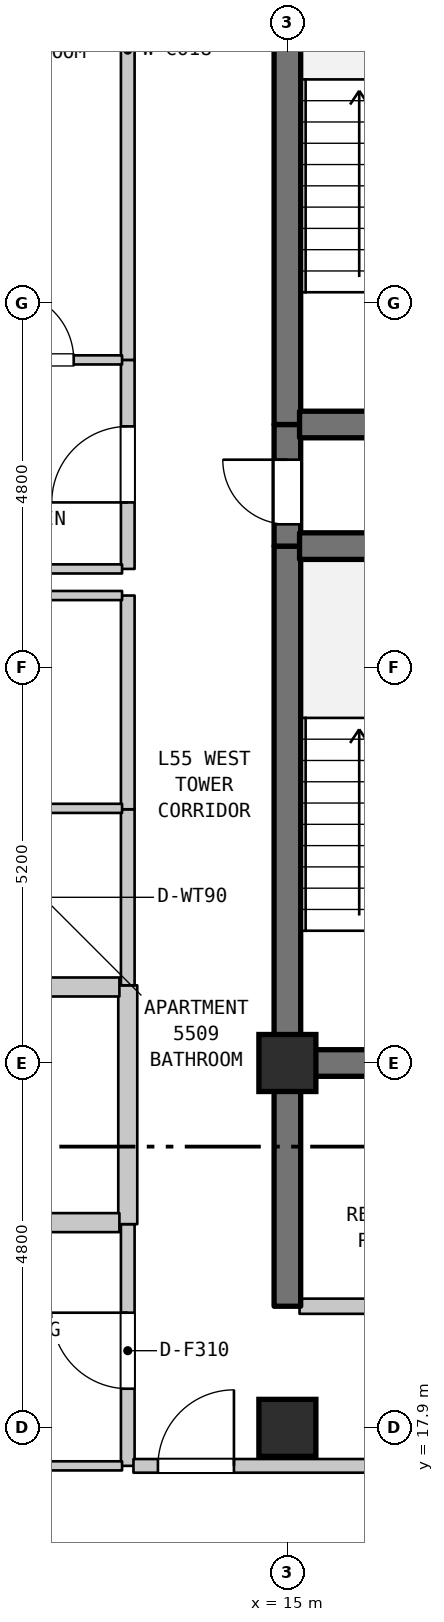
"""IFC4 building model, lengths in metres.
Left out: names, types, materials, properties, quantities, classifications, styles, units other than length and angle.
Written with IfcOpenShell. Run it as: python <this file> out.ifc"""

import sys

from ifc_helpers import new_model, si_unit, direction, frame, frame_2d, origin, origin_2d, place, context, subcontext, project, spatial, rectangle, extrude, element, fill, save


model = new_model("IFC4")
c1 = context("Model", 3, precision=1e-05, world=origin(), true_north=direction((0.0, 1.0)))
c2 = subcontext(c1, "Body", "Model", "MODEL_VIEW")
j1 = project(units=[si_unit("LENGTHUNIT", "METRE"), si_unit("PLANEANGLEUNIT", "RADIAN")], contexts=[c1])
p1 = place(None, origin())
s1 = spatial("IfcSite", under=j1, at=p1, CompositionType="ELEMENT")
p2 = place(p1, origin())
s2 = spatial("IfcBuilding", under=s1, at=p2, CompositionType="ELEMENT")
p3 = place(p2, frame((0.0, 0.0, 222.8)))
s3 = spatial("IfcBuildingStorey", under=s2, at=p3, CompositionType="ELEMENT", Elevation=222.8)
for number, where, z_axis, x_axis in (
    (1, (15.0, 17.9, 0.0), (0.0, 0.0, 1.0), (1.0, 0.0, 0.0)),
    (2, (15.0, 22.7, 0.0), (0.0, 0.0, 1.0), (1.0, 0.0, 0.0)),
):
    element("IfcColumn", number, at=place(p3, frame(where, z_axis=z_axis, x_axis=x_axis)), inside=s3, PredefinedType="COLUMN", context=c2, shape_type="SweptSolid", body=[
        extrude(rectangle(XDim=0.75, YDim=0.75, at=origin_2d()), origin(), (0.0, 0.0, 1.0), 3.7),
    ])
p4 = place(p3, frame((12.9, 17.4, 0.0), z_axis=(0.0, 0.0, 1.0), x_axis=(0.0, 1.0, 0.0)))
e3 = element("IfcWall", 3, at=p4, inside=s3, PredefinedType="STANDARD", context=c2, shape_type="SweptSolid", body=[
    extrude(rectangle(XDim=3.18, YDim=0.18, at=frame_2d((1.59, 0.0))), origin(), (0.0, 0.0, 1.0), 3.39),
])
p5 = place(p4, frame((1.015, 0.0, 0.0)))
e4 = element("IfcOpeningElement", 4, at=p5, cuts=e3, PredefinedType="OPENING", context=c2, shape_type="SweptSolid", body=[
    extrude(rectangle(XDim=1.0, YDim=2.15, at=frame_2d((0.5, 1.075))), frame((0.0, 0.1, 0.0), z_axis=(0.0, -1.0, 0.0), x_axis=(1.0, 0.0, 0.0)), (0.0, 0.0, 1.0), 0.2),
])
p6 = place(p3, frame((12.9, 20.58, 0.0), z_axis=(0.0, 0.0, 1.0), x_axis=(0.0, 1.0, 0.0)))
e5 = element("IfcWall", 5, at=p6, inside=s3, PredefinedType="STANDARD", context=c2, shape_type="SweptSolid", body=[
    extrude(rectangle(XDim=3.142, YDim=0.25, at=frame_2d((1.571, 0.0))), origin(), (0.0, 0.0, 1.0), 3.39),
])
p7 = place(p3, frame((12.9, 23.722, 0.0), z_axis=(0.0, 0.0, 1.0), x_axis=(0.0, 1.0, 0.0)))
e6 = element("IfcWall", 6, at=p7, inside=s3, PredefinedType="STANDARD", context=c2, shape_type="SweptSolid", body=[
    extrude(rectangle(XDim=2.316, YDim=0.18, at=frame_2d((1.158, 0.0))), origin(), (0.0, 0.0, 1.0), 3.39),
])
p8 = place(p3, frame((12.9, 26.038, 0.0), z_axis=(0.0, 0.0, 1.0), x_axis=(0.0, 1.0, 0.0)))
e7 = element("IfcWall", 7, at=p8, inside=s3, PredefinedType="STANDARD", context=c2, shape_type="SweptSolid", body=[
    extrude(rectangle(XDim=2.812, YDim=0.18, at=frame_2d((1.406, 0.0))), origin(), (0.0, 0.0, 1.0), 3.39),
])
p9 = place(p3, frame((12.9, 29.2, 0.0), z_axis=(0.0, 0.0, 1.0), x_axis=(0.0, 1.0, 0.0)))
e8 = element("IfcWall", 8, at=p9, inside=s3, PredefinedType="STANDARD", context=c2, shape_type="SweptSolid", body=[
    extrude(rectangle(XDim=2.75, YDim=0.18, at=frame_2d((1.375, 0.0))), origin(), (0.0, 0.0, 1.0), 3.39),
])
p10 = place(p9, frame((0.875, 0.0, 0.0)))
e9 = element("IfcOpeningElement", 9, at=p10, cuts=e8, PredefinedType="OPENING", context=c2, shape_type="SweptSolid", body=[
    extrude(rectangle(XDim=1.0, YDim=2.15, at=frame_2d((0.5, 1.075))), frame((0.0, 0.1, 0.0), z_axis=(0.0, -1.0, 0.0), x_axis=(1.0, 0.0, 0.0)), (0.0, 0.0, 1.0), 0.2),
])
p11 = place(p3, frame((12.9, 31.95, 0.0), z_axis=(0.0, 0.0, 1.0), x_axis=(0.0, 1.0, 0.0)))
e10 = element("IfcWall", 10, at=p11, inside=s3, PredefinedType="STANDARD", context=c2, shape_type="SweptSolid", body=[
    extrude(rectangle(XDim=8.15, YDim=0.18, at=frame_2d((4.075, 0.0))), origin(), (0.0, 0.0, 1.0), 3.39),
])
p12 = place(p3, frame((15.0, 19.5, 0.0), z_axis=(0.0, 0.0, 1.0), x_axis=(0.0, 1.0, 0.0)))
e11 = element("IfcWall", 11, at=p12, inside=s3, PredefinedType="SHEAR", context=c2, shape_type="SweptSolid", body=[
    extrude(rectangle(XDim=3.2, YDim=0.35, at=frame_2d((1.6, 0.0))), origin(), (0.0, 0.0, 1.0), 3.39),
])
p13 = place(p3, frame((15.0, 22.7, 0.0), z_axis=(0.0, 0.0, 1.0), x_axis=(0.0, 1.0, 0.0)))
e12 = element("IfcWall", 12, at=p13, inside=s3, PredefinedType="SHEAR", context=c2, shape_type="SweptSolid", body=[
    extrude(rectangle(XDim=6.8, YDim=0.35, at=frame_2d((3.4, 0.0))), origin(), (0.0, 0.0, 1.0), 3.39),
])
p14 = place(p3, frame((15.0, 29.5, 0.0), z_axis=(0.0, 0.0, 1.0), x_axis=(0.0, 1.0, 0.0)))
e13 = element("IfcWall", 13, at=p14, inside=s3, PredefinedType="SHEAR", context=c2, shape_type="SweptSolid", body=[
    extrude(rectangle(XDim=1.6, YDim=0.35, at=frame_2d((0.8, 0.0))), origin(), (0.0, 0.0, 1.0), 3.39),
])
p15 = place(p14, frame((0.287, 0.0, 0.0)))
e14 = element("IfcOpeningElement", 14, at=p15, cuts=e13, PredefinedType="OPENING", context=c2, shape_type="SweptSolid", body=[
    extrude(rectangle(XDim=0.85, YDim=2.1, at=frame_2d((0.425, 1.05))), frame((0.0, 0.185, 0.0), z_axis=(0.0, -1.0, 0.0), x_axis=(1.0, 0.0, 0.0)), (0.0, 0.0, 1.0), 0.37),
])
p16 = place(p3, frame((15.0, 31.1, 0.0), z_axis=(0.0, 0.0, 1.0), x_axis=(0.0, 1.0, 0.0)))
e15 = element("IfcWall", 15, at=p16, inside=s3, PredefinedType="SHEAR", context=c2, shape_type="SweptSolid", body=[
    extrude(rectangle(XDim=6.8, YDim=0.35, at=frame_2d((3.4, 0.0))), origin(), (0.0, 0.0, 1.0), 3.39),
])
p17 = place(p3, frame((8.973, 17.4, 0.0), z_axis=(0.0, 0.0, 1.0), x_axis=(1.0, 0.0, 0.0)))
e16 = element("IfcWall", 16, at=p17, inside=s3, PredefinedType="PARTITIONING", context=c2, shape_type="SweptSolid", body=[
    extrude(rectangle(XDim=3.852, YDim=0.12, at=frame_2d((1.926, 0.0))), origin(), (0.0, 0.0, 1.0), 3.39),
])
p18 = place(p3, frame((12.975, 17.4, 0.0), z_axis=(0.0, 0.0, 1.0), x_axis=(1.0, 0.0, 0.0)))
e17 = element("IfcWall", 17, at=p18, inside=s3, PredefinedType="STANDARD", context=c2, shape_type="SweptSolid", body=[
    extrude(rectangle(XDim=3.68, YDim=0.18, at=frame_2d((1.84, 0.0))), origin(), (0.0, 0.0, 1.0), 3.39),
])
p19 = place(p18, frame((0.322, 0.0, 0.0)))
e18 = element("IfcOpeningElement", 18, at=p19, cuts=e17, PredefinedType="OPENING", context=c2, shape_type="SweptSolid", body=[
    extrude(rectangle(XDim=1.0, YDim=2.15, at=frame_2d((0.5, 1.075))), frame((0.0, 0.1, 0.0), z_axis=(0.0, -1.0, 0.0), x_axis=(1.0, 0.0, 0.0)), (0.0, 0.0, 1.0), 0.2),
])
p20 = place(p3, frame((15.16, 19.5, 0.0), z_axis=(0.0, 0.0, 1.0), x_axis=(1.0, 0.0, 0.0)))
e19 = element("IfcWall", 19, at=p20, inside=s3, PredefinedType="STANDARD", context=c2, shape_type="SweptSolid", body=[
    extrude(rectangle(XDim=3.68, YDim=0.2, at=frame_2d((1.84, 0.0))), origin(), (0.0, 0.0, 1.0), 3.39),
])
p21 = place(p20, frame((1.39, 0.0, 0.0)))
e20 = element("IfcOpeningElement", 20, at=p21, cuts=e19, PredefinedType="OPENING", context=c2, shape_type="SweptSolid", body=[
    extrude(rectangle(XDim=0.9, YDim=2.15, at=frame_2d((0.45, 1.075))), frame((0.0, 0.11, 0.0), z_axis=(0.0, -1.0, 0.0), x_axis=(1.0, 0.0, 0.0)), (0.0, 0.0, 1.0), 0.22),
])
p22 = place(p3, frame((10.76, 20.6, 0.0), z_axis=(0.0, 0.0, 1.0), x_axis=(1.0, 0.0, 0.0)))
e21 = element("IfcWall", 21, at=p22, inside=s3, PredefinedType="STANDARD", context=c2, shape_type="SweptSolid", body=[
    extrude(rectangle(XDim=2.03, YDim=0.25, at=frame_2d((1.015, 0.0))), origin(), (0.0, 0.0, 1.0), 3.39),
])
p23 = place(p3, frame((15.16, 22.7, 0.0), z_axis=(0.0, 0.0, 1.0), x_axis=(1.0, 0.0, 0.0)))
e22 = element("IfcWall", 22, at=p23, inside=s3, PredefinedType="SHEAR", context=c2, shape_type="SweptSolid", body=[
    extrude(rectangle(XDim=3.68, YDim=0.35, at=frame_2d((1.84, 0.0))), origin(), (0.0, 0.0, 1.0), 3.39),
])
p24 = place(p3, frame((10.76, 23.7, 0.0), z_axis=(0.0, 0.0, 1.0), x_axis=(1.0, 0.0, 0.0)))
e23 = element("IfcWall", 23, at=p24, inside=s3, PredefinedType="STANDARD", context=c2, shape_type="SweptSolid", body=[
    extrude(rectangle(XDim=2.03, YDim=0.25, at=frame_2d((1.015, 0.0))), origin(), (0.0, 0.0, 1.0), 3.39),
])
for number, where, z_axis, x_axis in (
    (24, (10.695, 26.05, 0.0), (0.0, 0.0, 1.0), (1.0, 0.0, 0.0)),
    (25, (10.695, 28.85, 0.0), (0.0, 0.0, 1.0), (1.0, 0.0, 0.0)),
):
    element("IfcWall", number, at=place(p3, frame(where, z_axis=z_axis, x_axis=x_axis)), inside=s3, PredefinedType="PARTITIONING", context=c2, shape_type="SweptSolid", body=[
        extrude(rectangle(XDim=2.13, YDim=0.12, at=frame_2d((1.065, 0.0))), origin(), (0.0, 0.0, 1.0), 3.39),
    ])
p25 = place(p3, frame((9.13, 29.2, 0.0), z_axis=(0.0, 0.0, 1.0), x_axis=(1.0, 0.0, 0.0)))
e26 = element("IfcWall", 26, at=p25, inside=s3, PredefinedType="PARTITIONING", context=c2, shape_type="SweptSolid", body=[
    extrude(rectangle(XDim=3.695, YDim=0.12, at=frame_2d((1.848, 0.0))), origin(), (0.0, 0.0, 1.0), 3.39),
])
for number, where, z_axis, x_axis in (
    (27, (15.16, 29.5, 0.0), (0.0, 0.0, 1.0), (1.0, 0.0, 0.0)),
    (28, (15.16, 31.1, 0.0), (0.0, 0.0, 1.0), (1.0, 0.0, 0.0)),
):
    element("IfcWall", number, at=place(p3, frame(where, z_axis=z_axis, x_axis=x_axis)), inside=s3, PredefinedType="SHEAR", context=c2, shape_type="SweptSolid", body=[
        extrude(rectangle(XDim=3.68, YDim=0.35, at=frame_2d((1.84, 0.0))), origin(), (0.0, 0.0, 1.0), 3.39),
    ])
p26 = place(p3, frame((10.623, 31.95, 0.0), z_axis=(0.0, 0.0, 1.0), x_axis=(1.0, 0.0, 0.0)))
e29 = element("IfcWall", 29, at=p26, inside=s3, PredefinedType="PARTITIONING", context=c2, shape_type="SweptSolid", body=[
    extrude(rectangle(XDim=2.202, YDim=0.12, at=frame_2d((1.101, 0.0))), origin(), (0.0, 0.0, 1.0), 3.39),
])
p27 = place(p26, frame((0.666, 0.0, 0.0)))
e30 = element("IfcOpeningElement", 30, at=p27, cuts=e29, PredefinedType="OPENING", context=c2, shape_type="SweptSolid", body=[
    extrude(rectangle(XDim=0.9, YDim=2.1, at=frame_2d((0.45, 1.05))), frame((0.0, 0.07, 0.0), z_axis=(0.0, -1.0, 0.0), x_axis=(1.0, 0.0, 0.0)), (0.0, 0.0, 1.0), 0.14),
])
p28 = place(p5, origin())
e31 = element("IfcDoor", 31, at=p28, inside=s3, OperationType="SINGLE_SWING_RIGHT", PredefinedType="DOOR", context=c2, shape_type="SweptSolid", body=[
    extrude(rectangle(XDim=1.0, YDim=2.15, at=frame_2d((0.5, 1.075))), frame((0.0, 0.025, 0.0), z_axis=(0.0, -1.0, 0.0), x_axis=(1.0, 0.0, 0.0)), (0.0, 0.0, 1.0), 0.05),
])
fill(e4, e31)
p29 = place(p10, origin())
e32 = element("IfcDoor", 32, at=p29, inside=s3, OperationType="SINGLE_SWING_LEFT", PredefinedType="DOOR", context=c2, shape_type="SweptSolid", body=[
    extrude(rectangle(XDim=1.0, YDim=2.15, at=frame_2d((0.5, 1.075))), frame((0.0, 0.025, 0.0), z_axis=(0.0, -1.0, 0.0), x_axis=(1.0, 0.0, 0.0)), (0.0, 0.0, 1.0), 0.05),
])
fill(e9, e32)
p30 = place(p15, origin())
e33 = element("IfcDoor", 33, at=p30, inside=s3, OperationType="SINGLE_SWING_RIGHT", PredefinedType="DOOR", context=c2, shape_type="SweptSolid", body=[
    extrude(rectangle(XDim=0.85, YDim=2.1, at=frame_2d((0.425, 1.05))), frame((0.0, 0.025, 0.0), z_axis=(0.0, -1.0, 0.0), x_axis=(1.0, 0.0, 0.0)), (0.0, 0.0, 1.0), 0.05),
])
fill(e14, e33)
p31 = place(p19, origin())
e34 = element("IfcDoor", 34, at=p31, inside=s3, OperationType="SINGLE_SWING_RIGHT", PredefinedType="DOOR", context=c2, shape_type="SweptSolid", body=[
    extrude(rectangle(XDim=1.0, YDim=2.15, at=frame_2d((0.5, 1.075))), frame((0.0, 0.025, 0.0), z_axis=(0.0, -1.0, 0.0), x_axis=(1.0, 0.0, 0.0)), (0.0, 0.0, 1.0), 0.05),
])
fill(e18, e34)
p32 = place(p27, origin())
e35 = element("IfcDoor", 35, at=p32, inside=s3, OperationType="SINGLE_SWING_LEFT", PredefinedType="DOOR", context=c2, shape_type="SweptSolid", body=[
    extrude(rectangle(XDim=0.9, YDim=2.1, at=frame_2d((0.45, 1.05))), frame((0.0, 0.025, 0.0), z_axis=(0.0, -1.0, 0.0), x_axis=(1.0, 0.0, 0.0)), (0.0, 0.0, 1.0), 0.05),
])
fill(e30, e35)
save(model, sys.argv[1])
